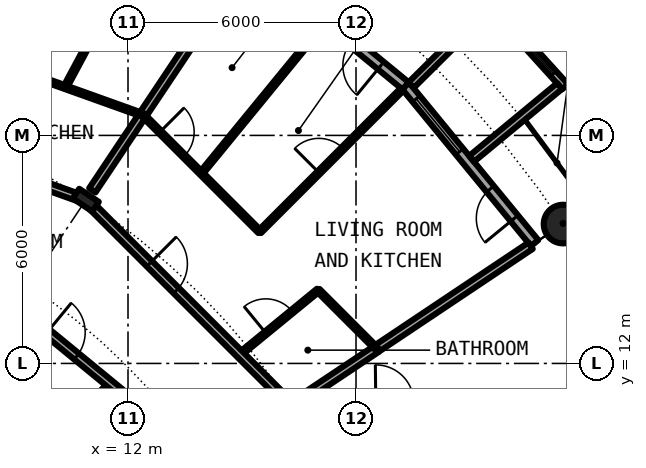
"""IFC4 building model, lengths in metres.
Left out: names, types, materials, properties, quantities, classifications, styles, units other than length and angle.
Written with IfcOpenShell. Run it as: python <this file> out.ifc"""

import sys

from ifc_helpers import new_model, si_unit, direction, frame, frame_2d, origin, origin_2d, place, context, subcontext, project, spatial, rectangle, circle, hollow_circle, i_section, extrude, element, fill, save


model = new_model("IFC4")
c1 = context("Model", 3, precision=1e-05, world=origin(), true_north=direction((0.0, 1.0)))
c2 = subcontext(c1, "Body", "Model", "MODEL_VIEW")
j1 = project(units=[si_unit("LENGTHUNIT", "METRE"), si_unit("PLANEANGLEUNIT", "RADIAN")], contexts=[c1])
p1 = place(None, origin())
s1 = spatial("IfcSite", under=j1, at=p1, CompositionType="ELEMENT")
p2 = place(p1, origin())
s2 = spatial("IfcBuilding", under=s1, at=p2, CompositionType="ELEMENT")
p3 = place(p2, frame((0.0, 0.0, 35.0)))
s3 = spatial("IfcBuildingStorey", under=s2, at=p3, CompositionType="ELEMENT", Elevation=35.0)
p4 = place(p3, frame((23.448, 15.667, 0.0), z_axis=(0.0, 0.0, 1.0), x_axis=(1.0, 0.0, 0.0)))
e1 = element("IfcColumn", 1, at=p4, inside=s3, PredefinedType="COLUMN", context=c2, shape_type="SweptSolid", body=[
    extrude(hollow_circle(Radius=0.508, WallThickness=0.05, at=origin_2d()), origin(), (0.0, 0.0, 1.0), 3.05),
])
p5 = place(p3, frame((10.889, 16.297, 0.0), z_axis=(0.0, 0.0, 1.0), x_axis=(0.55557023302, 0.831469612303, 0.0)))
e2 = element("IfcColumn", 2, at=p5, inside=s3, PredefinedType="COLUMN", context=c2, shape_type="SweptSolid", body=[
    extrude(i_section(OverallWidth=0.305, OverallDepth=0.62, WebThickness=0.021, FlangeThickness=0.04, FilletRadius=0.027, at=origin_2d()), origin(), (0.0, 0.0, 1.0), 3.05),
])
p6 = place(p3, frame((22.699, 15.167, 0.0), z_axis=(0.0, 0.0, 1.0), x_axis=(-0.634382322723, 0.773019449054, 0.0)))
e3 = element("IfcWall", 3, at=p6, inside=s3, PredefinedType="SOLIDWALL", context=c2, shape_type="SweptSolid", body=[
    extrude(rectangle(XDim=5.352, YDim=0.25, at=frame_2d((2.676, 0.0))), origin(), (0.0, 0.0, 1.0), 2.7),
])
p7 = place(p6, frame((0.841, 0.0, 0.0)))
e4 = element("IfcOpeningElement", 4, at=p7, cuts=e3, PredefinedType="OPENING", context=c2, shape_type="SweptSolid", body=[
    extrude(rectangle(XDim=1.0, YDim=2.2, at=frame_2d((0.5, 1.1))), frame((0.0, 0.135, 0.0), z_axis=(0.0, -1.0, 0.0), x_axis=(1.0, 0.0, 0.0)), (0.0, 0.0, 1.0), 0.27),
])
p8 = place(p6, frame((3.111, 0.0, 0.3)))
e5 = element("IfcOpeningElement", 5, at=p8, cuts=e3, PredefinedType="OPENING", context=c2, shape_type="SweptSolid", body=[
    extrude(rectangle(XDim=1.8, YDim=2.1, at=frame_2d((0.9, 1.05))), frame((0.0, 0.135, 0.0), z_axis=(0.0, -1.0, 0.0), x_axis=(1.0, 0.0, 0.0)), (0.0, 0.0, 1.0), 0.27),
])
p9 = place(p3, frame((23.503, 19.282, -0.03), z_axis=(0.0, 0.0, 1.0), x_axis=(-0.671506829416, 0.740998365753, 0.0)))
e6 = element("IfcWall", 6, at=p9, inside=s3, PredefinedType="SOLIDWALL", context=c2, shape_type="SweptSolid", body=[
    extrude(rectangle(XDim=2.993, YDim=0.2, at=frame_2d((1.497, 0.0))), origin(), (0.0, 0.0, 1.0), 2.73),
])
p10 = place(p9, frame((0.457, 0.0, 0.33)))
e7 = element("IfcOpeningElement", 7, at=p10, cuts=e6, PredefinedType="OPENING", context=c2, shape_type="SweptSolid", body=[
    extrude(circle(Radius=1.04, at=frame_2d((1.04, 1.04))), frame((0.0, 0.11, 0.0), z_axis=(0.0, -1.0, 0.0), x_axis=(1.0, 0.0, 0.0)), (0.0, 0.0, 1.0), 0.22),
])
p11 = place(p3, frame((21.041, 17.384, -0.03), z_axis=(0.0, 0.0, 1.0), x_axis=(0.770784861449, 0.63709551667, 0.0)))
e8 = element("IfcWall", 8, at=p11, inside=s3, PredefinedType="SOLIDWALL", context=c2, shape_type="SweptSolid", body=[
    extrude(rectangle(XDim=3.006, YDim=0.2, at=frame_2d((1.503, 0.0))), origin(), (0.0, 0.0, 1.0), 2.73),
])
p12 = place(p3, frame((19.45, 19.323, -0.03), z_axis=(0.0, 0.0, 1.0), x_axis=(0.709727076896, 0.704476739375, 0.0)))
e9 = element("IfcWall", 9, at=p12, inside=s3, PredefinedType="SOLIDWALL", context=c2, shape_type="SweptSolid", body=[
    extrude(rectangle(XDim=2.883, YDim=0.2, at=frame_2d((1.441, 0.0))), origin(), (0.0, 0.0, 1.0), 2.73),
])
p13 = place(p3, frame((19.304, 19.304, 0.0), z_axis=(0.0, 0.0, 1.0), x_axis=(-0.773019449054, 0.634382322723, 0.0)))
e10 = element("IfcWall", 10, at=p13, inside=s3, PredefinedType="SOLIDWALL", context=c2, shape_type="SweptSolid", body=[
    extrude(rectangle(XDim=5.352, YDim=0.25, at=frame_2d((2.676, 0.0))), origin(), (0.0, 0.0, 1.0), 2.7),
])
p14 = place(p13, frame((0.841, 0.0, 0.0)))
e11 = element("IfcOpeningElement", 11, at=p14, cuts=e10, PredefinedType="OPENING", context=c2, shape_type="SweptSolid", body=[
    extrude(rectangle(XDim=1.0, YDim=2.2, at=frame_2d((0.5, 1.1))), frame((0.0, 0.135, 0.0), z_axis=(0.0, -1.0, 0.0), x_axis=(1.0, 0.0, 0.0)), (0.0, 0.0, 1.0), 0.27),
])
p15 = place(p13, frame((3.111, 0.0, 0.3)))
e12 = element("IfcOpeningElement", 12, at=p15, cuts=e10, PredefinedType="OPENING", context=c2, shape_type="SweptSolid", body=[
    extrude(rectangle(XDim=1.8, YDim=2.1, at=frame_2d((0.9, 1.05))), frame((0.0, 0.135, 0.0), z_axis=(0.0, -1.0, 0.0), x_axis=(1.0, 0.0, 0.0)), (0.0, 0.0, 1.0), 0.27),
])
p16 = place(p3, frame((7.302, 17.58, 0.0), z_axis=(0.0, 0.0, 1.0), x_axis=(0.383616168183, 0.923492628833, 0.0)))
e13 = element("IfcWall", 13, at=p16, inside=s3, PredefinedType="PARTITIONING", context=c2, shape_type="SweptSolid", body=[
    extrude(rectangle(XDim=8.138, YDim=0.1, at=frame_2d((4.069, 0.0))), origin(), (0.0, 0.0, 1.0), 2.7),
])
p17 = place(p16, frame((0.861, 0.0, 0.0)))
e14 = element("IfcOpeningElement", 14, at=p17, cuts=e13, PredefinedType="OPENING", context=c2, shape_type="SweptSolid", body=[
    extrude(rectangle(XDim=0.9, YDim=2.3, at=frame_2d((0.45, 1.15))), frame((0.0, 0.06, 0.0), z_axis=(0.0, -1.0, 0.0), x_axis=(1.0, 0.0, 0.0)), (0.0, 0.0, 1.0), 0.12),
])
p18 = place(p16, frame((4.931, 0.0, 0.0)))
e15 = element("IfcOpeningElement", 15, at=p18, cuts=e13, PredefinedType="OPENING", context=c2, shape_type="SweptSolid", body=[
    extrude(rectangle(XDim=0.9, YDim=2.3, at=frame_2d((0.45, 1.15))), frame((0.0, 0.06, 0.0), z_axis=(0.0, -1.0, 0.0), x_axis=(1.0, 0.0, 0.0)), (0.0, 0.0, 1.0), 0.12),
])
p19 = place(p3, frame((9.683, 9.632, 0.0), z_axis=(0.0, 0.0, 1.0), x_axis=(0.708796844581, 0.705412668665, 0.0)))
e16 = element("IfcWall", 16, at=p19, inside=s3, PredefinedType="PARTITIONING", context=c2, shape_type="SweptSolid", body=[
    extrude(rectangle(XDim=2.597, YDim=0.1, at=frame_2d((1.299, 0.0))), origin(), (0.0, 0.0, 1.0), 2.7),
])
p20 = place(p19, frame((0.849, 0.0, 0.0)))
e17 = element("IfcOpeningElement", 17, at=p20, cuts=e16, PredefinedType="OPENING", context=c2, shape_type="SweptSolid", body=[
    extrude(rectangle(XDim=0.9, YDim=2.3, at=frame_2d((0.45, 1.15))), frame((0.0, 0.06, 0.0), z_axis=(0.0, -1.0, 0.0), x_axis=(1.0, 0.0, 0.0)), (0.0, 0.0, 1.0), 0.12),
])
p21 = place(p3, frame((10.349, 19.272, 0.0), z_axis=(0.0, 0.0, 1.0), x_axis=(0.472967735543, 0.881079747319, 0.0)))
e18 = element("IfcWall", 18, at=p21, inside=s3, PredefinedType="PARTITIONING", context=c2, shape_type="SweptSolid", body=[
    extrude(rectangle(XDim=5.3, YDim=0.1, at=frame_2d((2.65, 0.0))), origin(), (0.0, 0.0, 1.0), 2.7),
])
p22 = place(p21, frame((2.2, 0.0, 0.0)))
e19 = element("IfcOpeningElement", 19, at=p22, cuts=e18, PredefinedType="OPENING", context=c2, shape_type="SweptSolid", body=[
    extrude(rectangle(XDim=0.9, YDim=2.3, at=frame_2d((0.45, 1.15))), frame((0.0, 0.06, 0.0), z_axis=(0.0, -1.0, 0.0), x_axis=(1.0, 0.0, 0.0)), (0.0, 0.0, 1.0), 0.12),
])
p23 = place(p3, frame((11.061, 16.555, 0.0), z_axis=(0.0, 0.0, 1.0), x_axis=(0.555576285599, 0.831465568067, 0.0)))
e20 = element("IfcWall", 20, at=p23, inside=s3, PredefinedType="PARTITIONING", context=c2, shape_type="SweptSolid", body=[
    extrude(rectangle(XDim=7.264, YDim=0.2, at=frame_2d((3.632, 0.0))), origin(), (0.0, 0.0, 1.0), 2.7),
])
p24 = place(p3, frame((13.927, 17.004, 0.0), z_axis=(0.0, 0.0, 1.0), x_axis=(0.633774976367, 0.773517471898, 0.0)))
e21 = element("IfcWall", 21, at=p24, inside=s3, PredefinedType="PARTITIONING", context=c2, shape_type="SweptSolid", body=[
    extrude(rectangle(XDim=5.196, YDim=0.1, at=frame_2d((2.598, 0.0))), origin(), (0.0, 0.0, 1.0), 2.7),
])
p25 = place(p3, frame((14.945, 12.241, 0.0), z_axis=(0.0, 0.0, 1.0), x_axis=(0.77367517848, 0.633582447834, 0.0)))
e22 = element("IfcWall", 22, at=p25, inside=s3, PredefinedType="PARTITIONING", context=c2, shape_type="SweptSolid", body=[
    extrude(rectangle(XDim=2.661, YDim=0.1, at=frame_2d((1.331, 0.0))), origin(), (0.0, 0.0, 1.0), 2.7),
])
p26 = place(p25, frame((0.881, 0.0, 0.0)))
e23 = element("IfcOpeningElement", 23, at=p26, cuts=e22, PredefinedType="OPENING", context=c2, shape_type="SweptSolid", body=[
    extrude(rectangle(XDim=0.9, YDim=2.3, at=frame_2d((0.45, 1.15))), frame((0.0, 0.06, 0.0), z_axis=(0.0, -1.0, 0.0), x_axis=(1.0, 0.0, 0.0)), (0.0, 0.0, 1.0), 0.12),
])
p27 = place(p3, frame((15.465, 15.465, 0.0), z_axis=(0.0, 0.0, 1.0), x_axis=(0.707106781187, 0.707106781187, 0.0)))
e24 = element("IfcWall", 24, at=p27, inside=s3, PredefinedType="PARTITIONING", context=c2, shape_type="SweptSolid", body=[
    extrude(rectangle(XDim=5.305, YDim=0.1, at=frame_2d((2.652, 0.0))), origin(), (0.0, 0.0, 1.0), 2.7),
])
p28 = place(p27, frame((2.202, 0.0, 0.0)))
e25 = element("IfcOpeningElement", 25, at=p28, cuts=e24, PredefinedType="OPENING", context=c2, shape_type="SweptSolid", body=[
    extrude(rectangle(XDim=0.9, YDim=2.3, at=frame_2d((0.45, 1.15))), frame((0.0, 0.06, 0.0), z_axis=(0.0, -1.0, 0.0), x_axis=(1.0, 0.0, 0.0)), (0.0, 0.0, 1.0), 0.12),
])
p29 = place(p3, frame((18.542, 12.389, 0.0), z_axis=(0.0, 0.0, 1.0), x_axis=(0.831387096605, 0.55569370664, 0.0)))
e26 = element("IfcWall", 26, at=p29, inside=s3, PredefinedType="PARTITIONING", context=c2, shape_type="SweptSolid", body=[
    extrude(rectangle(XDim=4.875, YDim=0.2, at=frame_2d((2.438, 0.0))), origin(), (0.0, 0.0, 1.0), 2.7),
])
p30 = place(p3, frame((16.555, 11.061, 0.0), z_axis=(0.0, 0.0, 1.0), x_axis=(0.832066006555, 0.554676627176, 0.0)))
e27 = element("IfcWall", 27, at=p30, inside=s3, PredefinedType="PARTITIONING", context=c2, shape_type="SweptSolid", body=[
    extrude(rectangle(XDim=2.39, YDim=0.2, at=frame_2d((1.195, 0.0))), origin(), (0.0, 0.0, 1.0), 2.7),
])
p31 = place(p3, frame((6.469, 15.613, 0.0), z_axis=(0.0, 0.0, 1.0), x_axis=(0.77298340166, -0.634426245326, 0.0)))
e28 = element("IfcWall", 28, at=p31, inside=s3, PredefinedType="PARTITIONING", context=c2, shape_type="SweptSolid", body=[
    extrude(rectangle(XDim=9.793, YDim=0.2, at=frame_2d((4.896, 0.0))), origin(), (0.0, 0.0, 1.0), 2.7),
])
p32 = place(p31, frame((4.404, 0.0, 0.0)))
e29 = element("IfcOpeningElement", 29, at=p32, cuts=e28, PredefinedType="OPENING", context=c2, shape_type="SweptSolid", body=[
    extrude(rectangle(XDim=1.0, YDim=2.3, at=frame_2d((0.5, 1.15))), frame((0.0, 0.11, 0.0), z_axis=(0.0, -1.0, 0.0), x_axis=(1.0, 0.0, 0.0)), (0.0, 0.0, 1.0), 0.22),
])
p33 = place(p3, frame((1.918, 19.506, 0.0), z_axis=(0.0, 0.0, 1.0), x_axis=(0.941574977747, -0.336803446065, 0.0)))
e30 = element("IfcWall", 30, at=p33, inside=s3, PredefinedType="PARTITIONING", context=c2, shape_type="SweptSolid", body=[
    extrude(rectangle(XDim=9.37, YDim=0.2, at=frame_2d((4.685, 0.0))), origin(), (0.0, 0.0, 1.0), 2.38),
])
p34 = place(p33, frame((3.313, 0.0, 0.0)))
e31 = element("IfcOpeningElement", 31, at=p34, cuts=e30, PredefinedType="OPENING", context=c2, shape_type="SweptSolid", body=[
    extrude(rectangle(XDim=1.0, YDim=2.3, at=frame_2d((0.5, 1.15))), frame((0.0, 0.11, 0.0), z_axis=(0.0, -1.0, 0.0), x_axis=(1.0, 0.0, 0.0)), (0.0, 0.0, 1.0), 0.22),
])
p35 = place(p3, frame((10.999, 16.187, 0.0), z_axis=(0.0, 0.0, 1.0), x_axis=(0.707106781187, -0.707106781187, 0.0)))
e32 = element("IfcWall", 32, at=p35, inside=s3, PredefinedType="PARTITIONING", context=c2, shape_type="SweptSolid", body=[
    extrude(rectangle(XDim=7.337, YDim=0.2, at=frame_2d((3.668, 0.0))), origin(), (0.0, 0.0, 1.0), 2.38),
])
p36 = place(p35, frame((2.212, 0.0, 0.0)))
e33 = element("IfcOpeningElement", 33, at=p36, cuts=e32, PredefinedType="OPENING", context=c2, shape_type="SweptSolid", body=[
    extrude(rectangle(XDim=1.0, YDim=2.3, at=frame_2d((0.5, 1.15))), frame((0.0, 0.11, 0.0), z_axis=(0.0, -1.0, 0.0), x_axis=(1.0, 0.0, 0.0)), (0.0, 0.0, 1.0), 0.22),
])
p37 = place(p3, frame((8.318, 19.996, 0.0), z_axis=(0.0, 0.0, 1.0), x_axis=(0.941370462946, -0.337374645598, 0.0)))
e34 = element("IfcWall", 34, at=p37, inside=s3, PredefinedType="PARTITIONING", context=c2, shape_type="SweptSolid", body=[
    extrude(rectangle(XDim=4.334, YDim=0.1, at=frame_2d((2.167, 0.0))), origin(), (0.0, 0.0, 1.0), 2.7),
])
p38 = place(p3, frame((12.389, 18.542, 0.0), z_axis=(0.0, 0.0, 1.0), x_axis=(0.707022606819, -0.707190945535, 0.0)))
e35 = element("IfcWall", 35, at=p38, inside=s3, PredefinedType="PARTITIONING", context=c2, shape_type="SweptSolid", body=[
    extrude(rectangle(XDim=4.351, YDim=0.1, at=frame_2d((2.175, 0.0))), origin(), (0.0, 0.0, 1.0), 2.7),
])
p39 = place(p38, frame((0.639, 0.0, 0.0)))
e36 = element("IfcOpeningElement", 36, at=p39, cuts=e35, PredefinedType="OPENING", context=c2, shape_type="SweptSolid", body=[
    extrude(rectangle(XDim=0.9, YDim=2.3, at=frame_2d((0.45, 1.15))), frame((0.0, 0.06, 0.0), z_axis=(0.0, -1.0, 0.0), x_axis=(1.0, 0.0, 0.0)), (0.0, 0.0, 1.0), 0.12),
])
p40 = place(p3, frame((17.006, 13.924, 0.0), z_axis=(0.0, 0.0, 1.0), x_axis=(0.706826194425, -0.707387256653, 0.0)))
e37 = element("IfcWall", 37, at=p40, inside=s3, PredefinedType="PARTITIONING", context=c2, shape_type="SweptSolid", body=[
    extrude(rectangle(XDim=2.176, YDim=0.1, at=frame_2d((1.088, 0.0))), origin(), (0.0, 0.0, 1.0), 2.7),
])
p41 = place(p7, origin())
e38 = element("IfcDoor", 38, at=p41, inside=s3, OperationType="SINGLE_SWING_LEFT", PredefinedType="DOOR", context=c2, shape_type="SweptSolid", body=[
    extrude(rectangle(XDim=1.0, YDim=2.2, at=frame_2d((0.5, 1.1))), frame((0.0, 0.025, 0.0), z_axis=(0.0, -1.0, 0.0), x_axis=(1.0, 0.0, 0.0)), (0.0, 0.0, 1.0), 0.05),
])
fill(e4, e38)
p42 = place(p8, origin())
e39 = element("IfcWindow", 39, at=p42, inside=s3, PartitioningType="SINGLE_PANEL", PredefinedType="WINDOW", context=c2, shape_type="SweptSolid", body=[
    extrude(rectangle(XDim=1.8, YDim=2.1, at=frame_2d((0.9, 1.05))), frame((0.0, 0.03, 0.0), z_axis=(0.0, -1.0, 0.0), x_axis=(1.0, 0.0, 0.0)), (0.0, 0.0, 1.0), 0.06),
])
fill(e5, e39)
p43 = place(p10, origin())
e40 = element("IfcWindow", 40, at=p43, inside=s3, PartitioningType="SINGLE_PANEL", PredefinedType="WINDOW", context=c2, shape_type="SweptSolid", body=[
    extrude(circle(Radius=1.04, at=frame_2d((1.04, 1.04))), frame((0.0, 0.03, 0.0), z_axis=(0.0, -1.0, 0.0), x_axis=(1.0, 0.0, 0.0)), (0.0, 0.0, 1.0), 0.06),
])
fill(e7, e40)
p44 = place(p14, origin())
e41 = element("IfcDoor", 41, at=p44, inside=s3, OperationType="SINGLE_SWING_LEFT", PredefinedType="DOOR", context=c2, shape_type="SweptSolid", body=[
    extrude(rectangle(XDim=1.0, YDim=2.2, at=frame_2d((0.5, 1.1))), frame((0.0, 0.025, 0.0), z_axis=(0.0, -1.0, 0.0), x_axis=(1.0, 0.0, 0.0)), (0.0, 0.0, 1.0), 0.05),
])
fill(e11, e41)
p45 = place(p36, origin())
e42 = element("IfcDoor", 42, at=p45, inside=s3, OperationType="SINGLE_SWING_LEFT", PredefinedType="DOOR", context=c2, shape_type="SweptSolid", body=[
    extrude(rectangle(XDim=1.0, YDim=2.3, at=frame_2d((0.5, 1.15))), frame((0.0, 0.025, 0.0), z_axis=(0.0, -1.0, 0.0), x_axis=(1.0, 0.0, 0.0)), (0.0, 0.0, 1.0), 0.05),
])
fill(e33, e42)
p46 = place(p26, origin())
e43 = element("IfcDoor", 43, at=p46, inside=s3, OperationType="SINGLE_SWING_LEFT", PredefinedType="DOOR", context=c2, shape_type="SweptSolid", body=[
    extrude(rectangle(XDim=0.9, YDim=2.3, at=frame_2d((0.45, 1.15))), frame((0.0, 0.025, 0.0), z_axis=(0.0, -1.0, 0.0), x_axis=(1.0, 0.0, 0.0)), (0.0, 0.0, 1.0), 0.05),
])
fill(e23, e43)
p47 = place(p28, origin())
e44 = element("IfcDoor", 44, at=p47, inside=s3, OperationType="SINGLE_SWING_RIGHT", PredefinedType="DOOR", context=c2, shape_type="SweptSolid", body=[
    extrude(rectangle(XDim=0.9, YDim=2.3, at=frame_2d((0.45, 1.15))), frame((0.0, 0.025, 0.0), z_axis=(0.0, -1.0, 0.0), x_axis=(1.0, 0.0, 0.0)), (0.0, 0.0, 1.0), 0.05),
])
fill(e25, e44)
p48 = place(p39, origin())
e45 = element("IfcDoor", 45, at=p48, inside=s3, OperationType="SINGLE_SWING_LEFT", PredefinedType="DOOR", context=c2, shape_type="SweptSolid", body=[
    extrude(rectangle(XDim=0.9, YDim=2.3, at=frame_2d((0.45, 1.15))), frame((0.0, 0.025, 0.0), z_axis=(0.0, -1.0, 0.0), x_axis=(1.0, 0.0, 0.0)), (0.0, 0.0, 1.0), 0.05),
])
fill(e36, e45)
p49 = place(p32, origin())
e46 = element("IfcDoor", 46, at=p49, inside=s3, OperationType="SINGLE_SWING_RIGHT", PredefinedType="DOOR", context=c2, shape_type="SweptSolid", body=[
    extrude(rectangle(XDim=1.0, YDim=2.3, at=frame_2d((0.5, 1.15))), frame((0.0, 0.025, 0.0), z_axis=(0.0, -1.0, 0.0), x_axis=(1.0, 0.0, 0.0)), (0.0, 0.0, 1.0), 0.05),
])
fill(e29, e46)
save(model, sys.argv[1])
